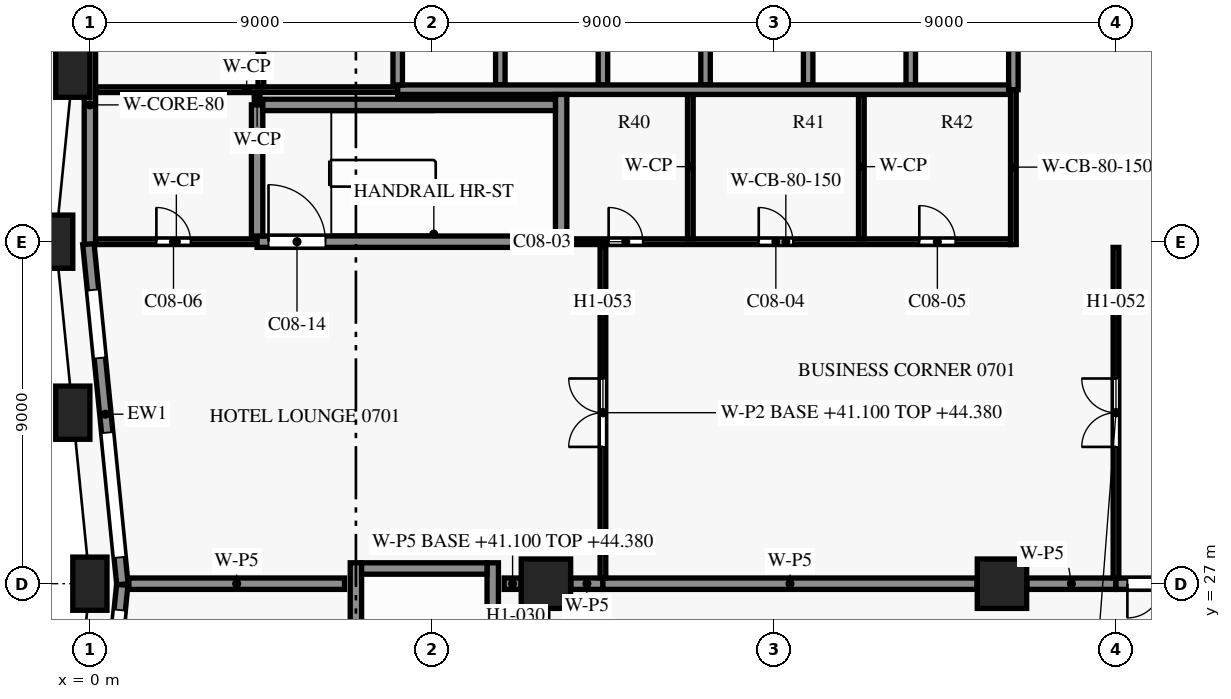
"""IFC4 building model, lengths in metres.
Left out: names, types, materials, properties, quantities, classifications, styles, units other than length and angle.
Written with IfcOpenShell. Run it as: python <this file> out.ifc"""

import sys

from ifc_helpers import new_model, si_unit, direction, frame, frame_2d, origin, origin_2d, place, context, subcontext, project, spatial, rectangle, extrude, element, fill, save


model = new_model("IFC4")
c1 = context("Model", 3, precision=1e-05, world=origin(), true_north=direction((0.0, 1.0)))
c2 = subcontext(c1, "Body", "Model", "MODEL_VIEW")
j1 = project(units=[si_unit("LENGTHUNIT", "METRE"), si_unit("PLANEANGLEUNIT", "RADIAN")], contexts=[c1])
p1 = place(None, origin())
s1 = spatial("IfcSite", under=j1, at=p1, CompositionType="ELEMENT")
p2 = place(p1, origin())
s2 = spatial("IfcBuilding", under=s1, at=p2, CompositionType="ELEMENT")
p3 = place(p2, frame((0.0, 0.0, 41.1)))
s3 = spatial("IfcBuildingStorey", under=s2, at=p3, CompositionType="ELEMENT", Elevation=41.1)
for number, where, z_axis, x_axis in (
    (1, (-0.45, 40.5, 0.0), (0.0, 0.0, 1.0), (-0.1, -0.995, 0.0)),
    (2, (-0.9, 36.0, 0.0), (0.0, 0.0, 1.0), (0.0, -1.0, 0.0)),
    (3, (-0.45, 31.5, 0.0), (0.0, 0.0, 1.0), (0.1, -0.995, 0.0)),
    (4, (0.0, 27.0, 0.0), (0.0, 0.0, 1.0), (0.0, -1.0, 0.0)),
):
    element("IfcColumn", number, at=place(p3, frame(where, z_axis=z_axis, x_axis=x_axis)), inside=s3, PredefinedType="COLUMN", context=c2, shape_type="SweptSolid", body=[
        extrude(rectangle(XDim=0.9, YDim=1.4, at=origin_2d()), origin(), (0.0, 0.0, 1.0), 3.6),
    ])
for number, where, z_axis, x_axis in (
    (5, (12.0, 27.0, 0.0), (0.0, 0.0, 1.0), (1.0, 0.0, 0.0)),
    (6, (24.0, 27.0, 0.0), (0.0, 0.0, 1.0), (1.0, 0.0, 0.0)),
):
    element("IfcColumn", number, at=place(p3, frame(where, z_axis=z_axis, x_axis=x_axis)), inside=s3, PredefinedType="COLUMN", context=c2, shape_type="SweptSolid", body=[
        extrude(rectangle(XDim=1.3, YDim=1.3, at=origin_2d()), origin(), (0.0, 0.0, 1.0), 3.6),
    ])
p4 = place(p3, frame((0.856, 26.985, 0.0), z_axis=(0.0, 0.0, 1.0), x_axis=(-0.099503719021, 0.99503719021, 0.0)))
e7 = element("IfcWall", 7, at=p4, inside=s3, PredefinedType="SOLIDWALL", context=c2, shape_type="SweptSolid", body=[
    extrude(rectangle(XDim=8.995, YDim=0.3, at=frame_2d((4.498, 0.0))), origin(), (0.0, 0.0, 1.0), 2.95),
])
p5 = place(p4, frame((0.711, 0.0, 0.15)))
e8 = element("IfcOpeningElement", 8, at=p5, cuts=e7, PredefinedType="OPENING", context=c2, shape_type="SweptSolid", body=[
    extrude(rectangle(XDim=3.3, YDim=2.4, at=frame_2d((1.65, 1.2))), frame((0.0, 0.16, 0.0), z_axis=(0.0, -1.0, 0.0), x_axis=(1.0, 0.0, 0.0)), (0.0, 0.0, 1.0), 0.32),
])
p6 = place(p4, frame((5.984, 0.0, 0.75)))
e9 = element("IfcOpeningElement", 9, at=p6, cuts=e7, PredefinedType="OPENING", context=c2, shape_type="SweptSolid", body=[
    extrude(rectangle(XDim=1.8, YDim=1.8, at=frame_2d((0.9, 0.9))), frame((0.0, 0.16, 0.0), z_axis=(0.0, -1.0, 0.0), x_axis=(1.0, 0.0, 0.0)), (0.0, 0.0, 1.0), 0.32),
])
p7 = place(p3, frame((-0.047, 17.985, 0.0), z_axis=(0.0, 0.0, 1.0), x_axis=(0.099522457379, 0.995035316196, 0.0)))
e10 = element("IfcWall", 10, at=p7, inside=s3, PredefinedType="SOLIDWALL", context=c2, shape_type="SweptSolid", body=[
    extrude(rectangle(XDim=9.03, YDim=0.3, at=frame_2d((4.515, 0.0))), origin(), (0.0, 0.0, 1.0), 2.95),
])
p8 = place(p7, frame((1.291, 0.0, 0.75)))
e11 = element("IfcOpeningElement", 11, at=p8, cuts=e10, PredefinedType="OPENING", context=c2, shape_type="SweptSolid", body=[
    extrude(rectangle(XDim=1.8, YDim=1.8, at=frame_2d((0.9, 0.9))), frame((0.0, 0.16, 0.0), z_axis=(0.0, -1.0, 0.0), x_axis=(1.0, 0.0, 0.0)), (0.0, 0.0, 1.0), 0.32),
])
p9 = place(p7, frame((5.064, 0.0, 0.15)))
e12 = element("IfcOpeningElement", 12, at=p9, cuts=e10, PredefinedType="OPENING", context=c2, shape_type="SweptSolid", body=[
    extrude(rectangle(XDim=3.3, YDim=2.4, at=frame_2d((1.65, 1.2))), frame((0.0, 0.16, 0.0), z_axis=(0.0, -1.0, 0.0), x_axis=(1.0, 0.0, 0.0)), (0.0, 0.0, 1.0), 0.32),
])
p10 = place(p3, frame((7.15, 27.4, 0.0), z_axis=(0.0, 0.0, 1.0), x_axis=(1.0, 0.0, 0.0)))
e13 = element("IfcWall", 13, at=p10, inside=s3, PredefinedType="SHEAR", context=c2, shape_type="SweptSolid", body=[
    extrude(rectangle(XDim=3.3, YDim=0.3, at=frame_2d((1.65, 0.0))), origin(), (0.0, 0.0, 1.0), 3.3),
])
p11 = place(p3, frame((0.15, 36.0, 0.0), z_axis=(0.0, 0.0, 1.0), x_axis=(1.0, 0.0, 0.0)))
e14 = element("IfcWall", 14, at=p11, inside=s3, PredefinedType="PARTITIONING", context=c2, shape_type="SweptSolid", body=[
    extrude(rectangle(XDim=4.25, YDim=0.15, at=frame_2d((2.125, 0.0))), origin(), (0.0, 0.0, 1.0), 3.3),
])
p12 = place(p11, frame((1.6, 0.0, 0.0)))
e15 = element("IfcOpeningElement", 15, at=p12, cuts=e14, PredefinedType="OPENING", context=c2, shape_type="SweptSolid", body=[
    extrude(rectangle(XDim=0.9, YDim=2.1, at=frame_2d((0.45, 1.05))), frame((0.0, 0.085, 0.0), z_axis=(0.0, -1.0, 0.0), x_axis=(1.0, 0.0, 0.0)), (0.0, 0.0, 1.0), 0.17),
])
p13 = place(p3, frame((12.4, 36.0, 0.0), z_axis=(0.0, 0.0, 1.0), x_axis=(1.0, 0.0, 0.0)))
e16 = element("IfcWall", 16, at=p13, inside=s3, PredefinedType="SHEAR", context=c2, shape_type="SweptSolid", body=[
    extrude(rectangle(XDim=11.825, YDim=0.15, at=frame_2d((5.913, 0.0))), origin(), (0.0, 0.0, 1.0), 3.3),
])
p14 = place(p13, frame((1.25, 0.0, 0.0)))
e17 = element("IfcOpeningElement", 17, at=p14, cuts=e16, PredefinedType="OPENING", context=c2, shape_type="SweptSolid", body=[
    extrude(rectangle(XDim=0.9, YDim=2.1, at=frame_2d((0.45, 1.05))), frame((0.0, 0.085, 0.0), z_axis=(0.0, -1.0, 0.0), x_axis=(1.0, 0.0, 0.0)), (0.0, 0.0, 1.0), 0.17),
])
p15 = place(p13, frame((5.2, 0.0, 0.0)))
e18 = element("IfcOpeningElement", 18, at=p15, cuts=e16, PredefinedType="OPENING", context=c2, shape_type="SweptSolid", body=[
    extrude(rectangle(XDim=0.9, YDim=2.1, at=frame_2d((0.45, 1.05))), frame((0.0, 0.085, 0.0), z_axis=(0.0, -1.0, 0.0), x_axis=(1.0, 0.0, 0.0)), (0.0, 0.0, 1.0), 0.17),
])
p16 = place(p13, frame((9.425, 0.0, 0.0)))
e19 = element("IfcOpeningElement", 19, at=p16, cuts=e16, PredefinedType="OPENING", context=c2, shape_type="SweptSolid", body=[
    extrude(rectangle(XDim=0.95, YDim=2.1, at=frame_2d((0.475, 1.05))), frame((0.0, 0.085, 0.0), z_axis=(0.0, -1.0, 0.0), x_axis=(1.0, 0.0, 0.0)), (0.0, 0.0, 1.0), 0.17),
])
p17 = place(p3, frame((4.4, 36.0, 0.0), z_axis=(0.0, 0.0, 1.0), x_axis=(1.0, 0.0, 0.0)))
e20 = element("IfcWall", 20, at=p17, inside=s3, PredefinedType="SHEAR", context=c2, shape_type="SweptSolid", body=[
    extrude(rectangle(XDim=8.0, YDim=0.3, at=frame_2d((4.0, 0.0))), origin(), (0.0, 0.0, 1.0), 3.3),
])
p18 = place(p17, frame((0.3, 0.0, 0.0)))
e21 = element("IfcOpeningElement", 21, at=p18, cuts=e20, PredefinedType="OPENING", context=c2, shape_type="SweptSolid", body=[
    extrude(rectangle(XDim=1.5, YDim=2.2, at=frame_2d((0.75, 1.1))), frame((0.0, 0.16, 0.0), z_axis=(0.0, -1.0, 0.0), x_axis=(1.0, 0.0, 0.0)), (0.0, 0.0, 1.0), 0.32),
])
p19 = place(p3, frame((4.55, 39.6, 0.0), z_axis=(0.0, 0.0, 1.0), x_axis=(1.0, 0.0, 0.0)))
e22 = element("IfcWall", 22, at=p19, inside=s3, PredefinedType="SHEAR", context=c2, shape_type="SweptSolid", body=[
    extrude(rectangle(XDim=7.7, YDim=0.3, at=frame_2d((3.85, 0.0))), origin(), (0.0, 0.0, 1.0), 3.3),
])
p20 = place(p3, frame((0.15, 40.0, 0.0), z_axis=(0.0, 0.0, 1.0), x_axis=(1.0, 0.0, 0.0)))
e23 = element("IfcWall", 23, at=p20, inside=s3, PredefinedType="PARTITIONING", context=c2, shape_type="SweptSolid", body=[
    extrude(rectangle(XDim=7.95, YDim=0.15, at=frame_2d((3.975, 0.0))), origin(), (0.0, 0.0, 1.0), 3.3),
])
p21 = place(p3, frame((8.1, 40.0, 0.0), z_axis=(0.0, 0.0, 1.0), x_axis=(1.0, 0.0, 0.0)))
e24 = element("IfcWall", 24, at=p21, inside=s3, PredefinedType="SHEAR", context=c2, shape_type="SweptSolid", body=[
    extrude(rectangle(XDim=16.075, YDim=0.25, at=frame_2d((8.038, 0.0))), origin(), (0.0, 0.0, 1.0), 3.3),
])
p22 = place(p3, frame((0.0, 35.925, 0.0), z_axis=(0.0, 0.0, 1.0), x_axis=(0.0, 1.0, 0.0)))
e25 = element("IfcWall", 25, at=p22, inside=s3, PredefinedType="SHEAR", context=c2, shape_type="SweptSolid", body=[
    extrude(rectangle(XDim=7.35, YDim=0.3, at=frame_2d((3.675, 0.0))), origin(), (0.0, 0.0, 1.0), 3.3),
])
p23 = place(p3, frame((4.4, 39.6, 0.0), z_axis=(0.0, 0.0, 1.0), x_axis=(0.0, 1.0, 0.0)))
e26 = element("IfcWall", 26, at=p23, inside=s3, PredefinedType="PARTITIONING", context=c2, shape_type="SweptSolid", body=[
    extrude(rectangle(XDim=0.325, YDim=0.15, at=frame_2d((0.163, 0.0))), origin(), (0.0, 0.0, 1.0), 3.3),
])
p24 = place(p3, frame((4.4, 36.15, 0.0), z_axis=(0.0, 0.0, 1.0), x_axis=(0.0, 1.0, 0.0)))
e27 = element("IfcWall", 27, at=p24, inside=s3, PredefinedType="SHEAR", context=c2, shape_type="SweptSolid", body=[
    extrude(rectangle(XDim=3.45, YDim=0.3, at=frame_2d((1.725, 0.0))), origin(), (0.0, 0.0, 1.0), 3.3),
])
p25 = place(p3, frame((4.5, 40.075, 0.0), z_axis=(0.0, 0.0, 1.0), x_axis=(0.0, 1.0, 0.0)))
e28 = element("IfcWall", 28, at=p25, inside=s3, PredefinedType="PARTITIONING", context=c2, shape_type="SweptSolid", body=[
    extrude(rectangle(XDim=3.05, YDim=0.15, at=frame_2d((1.525, 0.0))), origin(), (0.0, 0.0, 1.0), 3.3),
])
p26 = place(p3, frame((7.0, 19.25, 0.0), z_axis=(0.0, 0.0, 1.0), x_axis=(0.0, 1.0, 0.0)))
e29 = element("IfcWall", 29, at=p26, inside=s3, PredefinedType="SHEAR", context=c2, shape_type="SweptSolid", body=[
    extrude(rectangle(XDim=8.3, YDim=0.3, at=frame_2d((4.15, 0.0))), origin(), (0.0, 0.0, 1.0), 3.3),
])
p27 = place(p3, frame((8.1, 40.125, 0.0), z_axis=(0.0, 0.0, 1.0), x_axis=(0.0, 1.0, 0.0)))
e30 = element("IfcWall", 30, at=p27, inside=s3, PredefinedType="SHEAR", context=c2, shape_type="SweptSolid", body=[
    extrude(rectangle(XDim=2.95, YDim=0.25, at=frame_2d((1.475, 0.0))), origin(), (0.0, 0.0, 1.0), 3.3),
])
p28 = place(p3, frame((10.6, 19.25, 0.0), z_axis=(0.0, 0.0, 1.0), x_axis=(0.0, 1.0, 0.0)))
e31 = element("IfcWall", 31, at=p28, inside=s3, PredefinedType="SHEAR", context=c2, shape_type="SweptSolid", body=[
    extrude(rectangle(XDim=8.3, YDim=0.3, at=frame_2d((4.15, 0.0))), origin(), (0.0, 0.0, 1.0), 3.3),
])
p29 = place(p28, frame((0.55, 0.0, 0.0)))
e32 = element("IfcOpeningElement", 32, at=p29, cuts=e31, PredefinedType="OPENING", context=c2, shape_type="SweptSolid", body=[
    extrude(rectangle(XDim=1.2, YDim=2.2, at=frame_2d((0.6, 1.1))), frame((0.0, 0.16, 0.0), z_axis=(0.0, -1.0, 0.0), x_axis=(1.0, 0.0, 0.0)), (0.0, 0.0, 1.0), 0.32),
])
p30 = place(p3, frame((10.8, 40.125, 0.0), z_axis=(0.0, 0.0, 1.0), x_axis=(0.0, 1.0, 0.0)))
e33 = element("IfcWall", 33, at=p30, inside=s3, PredefinedType="SHEAR", context=c2, shape_type="SweptSolid", body=[
    extrude(rectangle(XDim=2.95, YDim=0.25, at=frame_2d((1.475, 0.0))), origin(), (0.0, 0.0, 1.0), 3.3),
])
p31 = place(p3, frame((12.4, 36.15, 0.0), z_axis=(0.0, 0.0, 1.0), x_axis=(0.0, 1.0, 0.0)))
e34 = element("IfcWall", 34, at=p31, inside=s3, PredefinedType="SHEAR", context=c2, shape_type="SweptSolid", body=[
    extrude(rectangle(XDim=3.725, YDim=0.3, at=frame_2d((1.863, 0.0))), origin(), (0.0, 0.0, 1.0), 3.3),
])
p32 = place(p3, frame((13.5, 40.125, 0.0), z_axis=(0.0, 0.0, 1.0), x_axis=(0.0, 1.0, 0.0)))
e35 = element("IfcWall", 35, at=p32, inside=s3, PredefinedType="SHEAR", context=c2, shape_type="SweptSolid", body=[
    extrude(rectangle(XDim=2.95, YDim=0.25, at=frame_2d((1.475, 0.0))), origin(), (0.0, 0.0, 1.0), 3.3),
])
p33 = place(p3, frame((15.8, 36.075, 0.0), z_axis=(0.0, 0.0, 1.0), x_axis=(0.0, 1.0, 0.0)))
e36 = element("IfcWall", 36, at=p33, inside=s3, PredefinedType="PARTITIONING", context=c2, shape_type="SweptSolid", body=[
    extrude(rectangle(XDim=3.8, YDim=0.15, at=frame_2d((1.9, 0.0))), origin(), (0.0, 0.0, 1.0), 3.3),
])
for number, where, z_axis, x_axis in (
    (37, (16.2, 40.125, 0.0), (0.0, 0.0, 1.0), (0.0, 1.0, 0.0)),
    (38, (18.9, 40.125, 0.0), (0.0, 0.0, 1.0), (0.0, 1.0, 0.0)),
):
    element("IfcWall", number, at=place(p3, frame(where, z_axis=z_axis, x_axis=x_axis)), inside=s3, PredefinedType="SHEAR", context=c2, shape_type="SweptSolid", body=[
        extrude(rectangle(XDim=2.95, YDim=0.25, at=frame_2d((1.475, 0.0))), origin(), (0.0, 0.0, 1.0), 3.3),
    ])
p34 = place(p3, frame((20.3, 36.075, 0.0), z_axis=(0.0, 0.0, 1.0), x_axis=(0.0, 1.0, 0.0)))
e39 = element("IfcWall", 39, at=p34, inside=s3, PredefinedType="PARTITIONING", context=c2, shape_type="SweptSolid", body=[
    extrude(rectangle(XDim=3.8, YDim=0.15, at=frame_2d((1.9, 0.0))), origin(), (0.0, 0.0, 1.0), 3.3),
])
p35 = place(p3, frame((21.6, 40.125, 0.0), z_axis=(0.0, 0.0, 1.0), x_axis=(0.0, 1.0, 0.0)))
e40 = element("IfcWall", 40, at=p35, inside=s3, PredefinedType="SHEAR", context=c2, shape_type="SweptSolid", body=[
    extrude(rectangle(XDim=2.95, YDim=0.25, at=frame_2d((1.475, 0.0))), origin(), (0.0, 0.0, 1.0), 3.3),
])
p36 = place(p3, frame((24.3, 35.925, 0.0), z_axis=(0.0, 0.0, 1.0), x_axis=(0.0, 1.0, 0.0)))
e41 = element("IfcWall", 41, at=p36, inside=s3, PredefinedType="SHEAR", context=c2, shape_type="SweptSolid", body=[
    extrude(rectangle(XDim=4.075, YDim=0.15, at=frame_2d((2.038, 0.0))), origin(), (0.0, 0.0, 1.0), 3.3),
])
p37 = place(p3, frame((24.3, 40.0, 0.0), z_axis=(0.0, 0.0, 1.0), x_axis=(0.0, 1.0, 0.0)))
e42 = element("IfcWall", 42, at=p37, inside=s3, PredefinedType="SHEAR", context=c2, shape_type="SweptSolid", body=[
    extrude(rectangle(XDim=3.325, YDim=0.25, at=frame_2d((1.663, 0.0))), origin(), (0.0, 0.0, 1.0), 3.3),
])
p38 = place(p3, frame((12.0, 26.345, 0.0), z_axis=(0.0, 0.0, 1.0), x_axis=(0.0, -1.0, 0.0)))
e43 = element("IfcWall", 43, at=p38, inside=s3, PredefinedType="PARTITIONING", context=c2, shape_type="SweptSolid", body=[
    extrude(rectangle(XDim=3.845, YDim=0.1, at=frame_2d((1.922, 0.0))), origin(), (0.0, 0.0, 1.0), 2.58),
])
p39 = place(p38, frame((1.145, 0.0, 0.0)))
e44 = element("IfcOpeningElement", 44, at=p39, cuts=e43, PredefinedType="OPENING", context=c2, shape_type="SweptSolid", body=[
    extrude(rectangle(XDim=0.9, YDim=2.1, at=frame_2d((0.45, 1.05))), frame((0.0, 0.06, 0.0), z_axis=(0.0, -1.0, 0.0), x_axis=(1.0, 0.0, 0.0)), (0.0, 0.0, 1.0), 0.12),
])
p40 = place(p3, frame((6.7, 27.0, 0.0), z_axis=(0.0, 0.0, 1.0), x_axis=(-1.0, 0.0, 0.0)))
e45 = element("IfcWall", 45, at=p40, inside=s3, PredefinedType="PARTITIONING", context=c2, shape_type="SweptSolid", body=[
    extrude(rectangle(XDim=5.675, YDim=0.3, at=frame_2d((2.837, 0.0))), origin(), (0.0, 0.0, 1.0), 2.58),
])
p41 = place(p3, frame((11.345, 27.0, 0.0), z_axis=(0.0, 0.0, 1.0), x_axis=(-1.0, 0.0, 0.0)))
e46 = element("IfcWall", 46, at=p41, inside=s3, PredefinedType="PARTITIONING", context=c2, shape_type="SweptSolid", body=[
    extrude(rectangle(XDim=0.445, YDim=0.3, at=frame_2d((0.223, 0.0))), origin(), (0.0, 0.0, 1.0), 3.28),
])
p42 = place(p3, frame((13.5, 27.0, 0.0), z_axis=(0.0, 0.0, 1.0), x_axis=(-1.0, 0.0, 0.0)))
e47 = element("IfcWall", 47, at=p42, inside=s3, PredefinedType="PARTITIONING", context=c2, shape_type="SweptSolid", body=[
    extrude(rectangle(XDim=0.845, YDim=0.3, at=frame_2d((0.422, 0.0))), origin(), (0.0, 0.0, 1.0), 2.58),
])
p43 = place(p3, frame((23.345, 27.0, 0.0), z_axis=(0.0, 0.0, 1.0), x_axis=(-1.0, 0.0, 0.0)))
e48 = element("IfcWall", 48, at=p43, inside=s3, PredefinedType="PARTITIONING", context=c2, shape_type="SweptSolid", body=[
    extrude(rectangle(XDim=9.845, YDim=0.3, at=frame_2d((4.922, 0.0))), origin(), (0.0, 0.0, 1.0), 2.58),
])
p44 = place(p3, frame((27.0, 27.0, 0.0), z_axis=(0.0, 0.0, 1.0), x_axis=(-1.0, 0.0, 0.0)))
e49 = element("IfcWall", 49, at=p44, inside=s3, PredefinedType="PARTITIONING", context=c2, shape_type="SweptSolid", body=[
    extrude(rectangle(XDim=2.345, YDim=0.3, at=frame_2d((1.172, 0.0))), origin(), (0.0, 0.0, 1.0), 2.58),
])
p45 = place(p3, frame((29.4, 27.0, 0.0), z_axis=(0.0, 0.0, 1.0), x_axis=(-1.0, 0.0, 0.0)))
e50 = element("IfcWall", 50, at=p45, inside=s3, PredefinedType="PARTITIONING", context=c2, shape_type="SweptSolid", body=[
    extrude(rectangle(XDim=2.4, YDim=0.3, at=frame_2d((1.2, 0.0))), origin(), (0.0, 0.0, 1.0), 2.58),
])
p46 = place(p45, frame((0.3, 0.0, 0.0)))
e51 = element("IfcOpeningElement", 51, at=p46, cuts=e50, PredefinedType="OPENING", context=c2, shape_type="SweptSolid", body=[
    extrude(rectangle(XDim=1.8, YDim=2.1, at=frame_2d((0.9, 1.05))), frame((0.0, 0.16, 0.0), z_axis=(0.0, -1.0, 0.0), x_axis=(1.0, 0.0, 0.0)), (0.0, 0.0, 1.0), 0.32),
])
p47 = place(p3, frame((27.0, 27.15, 0.0), z_axis=(0.0, 0.0, 1.0), x_axis=(0.0, 1.0, 0.0)))
e52 = element("IfcWall", 52, at=p47, inside=s3, PredefinedType="PARTITIONING", context=c2, shape_type="SweptSolid", body=[
    extrude(rectangle(XDim=8.7, YDim=0.15, at=frame_2d((4.35, 0.0))), origin(), (0.0, 0.0, 1.0), 3.28),
])
p48 = place(p47, frame((3.45, 0.0, 0.0)))
e53 = element("IfcOpeningElement", 53, at=p48, cuts=e52, PredefinedType="OPENING", context=c2, shape_type="SweptSolid", body=[
    extrude(rectangle(XDim=1.8, YDim=2.1, at=frame_2d((0.9, 1.05))), frame((0.0, 0.085, 0.0), z_axis=(0.0, -1.0, 0.0), x_axis=(1.0, 0.0, 0.0)), (0.0, 0.0, 1.0), 0.17),
])
p49 = place(p3, frame((13.5, 27.15, 0.0), z_axis=(0.0, 0.0, 1.0), x_axis=(0.0, 1.0, 0.0)))
e54 = element("IfcWall", 54, at=p49, inside=s3, PredefinedType="PARTITIONING", context=c2, shape_type="SweptSolid", body=[
    extrude(rectangle(XDim=8.7, YDim=0.15, at=frame_2d((4.35, 0.0))), origin(), (0.0, 0.0, 1.0), 3.28),
])
p50 = place(p49, frame((3.45, 0.0, 0.0)))
e55 = element("IfcOpeningElement", 55, at=p50, cuts=e54, PredefinedType="OPENING", context=c2, shape_type="SweptSolid", body=[
    extrude(rectangle(XDim=1.8, YDim=2.1, at=frame_2d((0.9, 1.05))), frame((0.0, 0.085, 0.0), z_axis=(0.0, -1.0, 0.0), x_axis=(1.0, 0.0, 0.0)), (0.0, 0.0, 1.0), 0.17),
])
p51 = place(p5, origin())
e56 = element("IfcWindow", 56, at=p51, inside=s3, PartitioningType="SINGLE_PANEL", PredefinedType="WINDOW", context=c2, shape_type="SweptSolid", body=[
    extrude(rectangle(XDim=3.3, YDim=2.4, at=frame_2d((1.65, 1.2))), frame((0.0, 0.03, 0.0), z_axis=(0.0, -1.0, 0.0), x_axis=(1.0, 0.0, 0.0)), (0.0, 0.0, 1.0), 0.06),
])
fill(e8, e56)
p52 = place(p6, origin())
e57 = element("IfcWindow", 57, at=p52, inside=s3, PartitioningType="SINGLE_PANEL", PredefinedType="WINDOW", context=c2, shape_type="SweptSolid", body=[
    extrude(rectangle(XDim=1.8, YDim=1.8, at=frame_2d((0.9, 0.9))), frame((0.0, 0.03, 0.0), z_axis=(0.0, -1.0, 0.0), x_axis=(1.0, 0.0, 0.0)), (0.0, 0.0, 1.0), 0.06),
])
fill(e9, e57)
p53 = place(p9, origin())
e58 = element("IfcWindow", 58, at=p53, inside=s3, PartitioningType="SINGLE_PANEL", PredefinedType="WINDOW", context=c2, shape_type="SweptSolid", body=[
    extrude(rectangle(XDim=3.3, YDim=2.4, at=frame_2d((1.65, 1.2))), frame((0.0, 0.03, 0.0), z_axis=(0.0, -1.0, 0.0), x_axis=(1.0, 0.0, 0.0)), (0.0, 0.0, 1.0), 0.06),
])
fill(e12, e58)
p54 = place(p14, origin())
e59 = element("IfcDoor", 59, at=p54, inside=s3, OperationType="SINGLE_SWING_RIGHT", PredefinedType="DOOR", context=c2, shape_type="SweptSolid", body=[
    extrude(rectangle(XDim=0.9, YDim=2.1, at=frame_2d((0.45, 1.05))), frame((0.0, 0.025, 0.0), z_axis=(0.0, -1.0, 0.0), x_axis=(1.0, 0.0, 0.0)), (0.0, 0.0, 1.0), 0.05),
])
fill(e17, e59)
p55 = place(p15, origin())
e60 = element("IfcDoor", 60, at=p55, inside=s3, OperationType="SINGLE_SWING_LEFT", PredefinedType="DOOR", context=c2, shape_type="SweptSolid", body=[
    extrude(rectangle(XDim=0.9, YDim=2.1, at=frame_2d((0.45, 1.05))), frame((0.0, 0.025, 0.0), z_axis=(0.0, -1.0, 0.0), x_axis=(1.0, 0.0, 0.0)), (0.0, 0.0, 1.0), 0.05),
])
fill(e18, e60)
p56 = place(p16, origin())
e61 = element("IfcDoor", 61, at=p56, inside=s3, OperationType="SINGLE_SWING_RIGHT", PredefinedType="DOOR", context=c2, shape_type="SweptSolid", body=[
    extrude(rectangle(XDim=0.95, YDim=2.1, at=frame_2d((0.475, 1.05))), frame((0.0, 0.025, 0.0), z_axis=(0.0, -1.0, 0.0), x_axis=(1.0, 0.0, 0.0)), (0.0, 0.0, 1.0), 0.05),
])
fill(e19, e61)
p57 = place(p12, origin())
e62 = element("IfcDoor", 62, at=p57, inside=s3, OperationType="SINGLE_SWING_LEFT", PredefinedType="DOOR", context=c2, shape_type="SweptSolid", body=[
    extrude(rectangle(XDim=0.9, YDim=2.1, at=frame_2d((0.45, 1.05))), frame((0.0, 0.025, 0.0), z_axis=(0.0, -1.0, 0.0), x_axis=(1.0, 0.0, 0.0)), (0.0, 0.0, 1.0), 0.05),
])
fill(e15, e62)
p58 = place(p18, origin())
e63 = element("IfcDoor", 63, at=p58, inside=s3, OperationType="SINGLE_SWING_RIGHT", PredefinedType="DOOR", context=c2, shape_type="SweptSolid", body=[
    extrude(rectangle(XDim=1.5, YDim=2.2, at=frame_2d((0.75, 1.1))), frame((0.0, 0.025, 0.0), z_axis=(0.0, -1.0, 0.0), x_axis=(1.0, 0.0, 0.0)), (0.0, 0.0, 1.0), 0.05),
])
fill(e21, e63)
p59 = place(p48, origin())
e64 = element("IfcDoor", 64, at=p59, inside=s3, OperationType="DOUBLE_DOOR_SINGLE_SWING", PredefinedType="DOOR", context=c2, shape_type="SweptSolid", body=[
    extrude(rectangle(XDim=1.8, YDim=2.1, at=frame_2d((0.9, 1.05))), frame((0.0, 0.025, 0.0), z_axis=(0.0, -1.0, 0.0), x_axis=(1.0, 0.0, 0.0)), (0.0, 0.0, 1.0), 0.05),
])
fill(e53, e64)
p60 = place(p50, origin())
e65 = element("IfcDoor", 65, at=p60, inside=s3, OperationType="DOUBLE_DOOR_SINGLE_SWING", PredefinedType="DOOR", context=c2, shape_type="SweptSolid", body=[
    extrude(rectangle(XDim=1.8, YDim=2.1, at=frame_2d((0.9, 1.05))), frame((0.0, 0.025, 0.0), z_axis=(0.0, -1.0, 0.0), x_axis=(1.0, 0.0, 0.0)), (0.0, 0.0, 1.0), 0.05),
])
fill(e55, e65)
p61 = place(p46, origin())
e66 = element("IfcDoor", 66, at=p61, inside=s3, OperationType="DOUBLE_DOOR_SINGLE_SWING", PredefinedType="DOOR", context=c2, shape_type="SweptSolid", body=[
    extrude(rectangle(XDim=1.8, YDim=2.1, at=frame_2d((0.9, 1.05))), frame((0.0, 0.025, 0.0), z_axis=(0.0, -1.0, 0.0), x_axis=(1.0, 0.0, 0.0)), (0.0, 0.0, 1.0), 0.05),
])
fill(e51, e66)
save(model, sys.argv[1])
